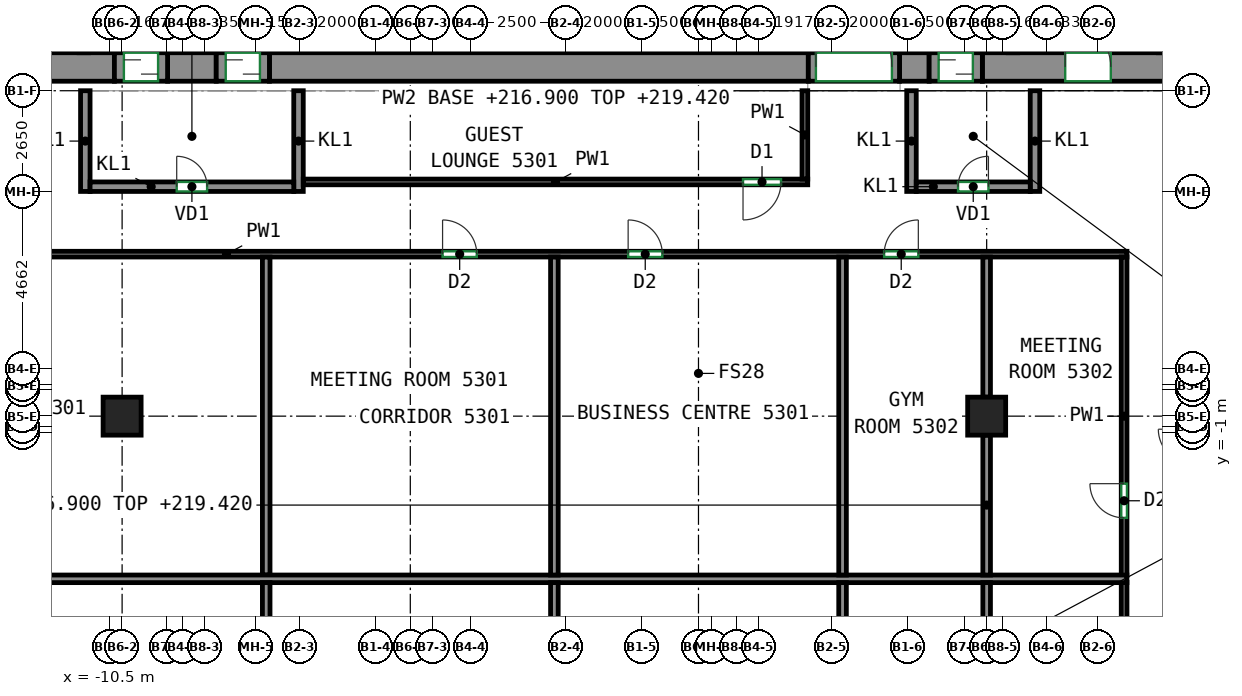
"""IFC4 building model, lengths in metres.
Left out: names, types, materials, properties, quantities, classifications, styles, units other than length and angle.
Written with IfcOpenShell. Run it as: python <this file> out.ifc"""

import sys

from ifc_helpers import new_model, si_unit, direction, frame, frame_2d, origin, origin_2d, place, context, subcontext, project, spatial, rectangle, extrude, source, transform, mapped, element, fill, save


model = new_model("IFC4")
c1 = context("Model", 3, precision=1e-05, world=origin(), true_north=direction((0.0, 1.0)))
c2 = subcontext(c1, "Body", "Model", "MODEL_VIEW")
j1 = project(units=[si_unit("LENGTHUNIT", "METRE"), si_unit("PLANEANGLEUNIT", "RADIAN")], contexts=[c1])
p1 = place(None, origin())
s1 = spatial("IfcSite", under=j1, at=p1, CompositionType="ELEMENT")
p2 = place(p1, origin())
s2 = spatial("IfcBuilding", under=s1, at=p2, CompositionType="ELEMENT")
p3 = place(p2, frame((0.0, 0.0, 216.9)))
s3 = spatial("IfcBuildingStorey", under=s2, at=p3, CompositionType="ELEMENT", Elevation=216.9)
m1 = source(origin(), c2, "Body", "SweptSolid", [
    extrude(rectangle(XDim=1.0, YDim=1.0, at=origin_2d()), origin(), (0.0, 0.0, 1.0), 3.12),
])
for number, where, z_axis, x_axis in (
    (1, (-10.167, -0.562, 0.0), (0.0, 0.0, 1.0), (1.0, 0.0, 0.0)),
    (2, (12.583, -0.562, 0.0), (0.0, 0.0, 1.0), (1.0, 0.0, 0.0)),
):
    element("IfcColumn", number, at=place(p3, frame(where, z_axis=z_axis, x_axis=x_axis)), inside=s3, PredefinedType="COLUMN", context=c2, shape_type="MappedRepresentation", body=[
        mapped(m1, transform((0.0, 0.0, 0.0))),
    ])
m2 = source(origin(), c2, "Body", "SweptSolid", [
    extrude(rectangle(XDim=5.38, YDim=0.75, at=frame_2d((2.69, 0.0))), origin(), (0.0, 0.0, 1.0), 3.12),
])
p4 = place(p3, frame((-15.75, 8.625, 0.0), z_axis=(0.0, 0.0, 1.0), x_axis=(1.0, 0.0, 0.0)))
e3 = element("IfcWall", 3, at=p4, inside=s3, PredefinedType="SHEAR", context=c2, shape_type="MappedRepresentation", body=[
    mapped(m2, transform((0.0, 0.0, 0.0))),
])
p5 = place(p4, frame((2.0, 0.0, 0.0)))
e4 = element("IfcOpeningElement", 4, at=p5, cuts=e3, PredefinedType="OPENING", context=c2, shape_type="SweptSolid", body=[
    extrude(rectangle(XDim=1.2, YDim=2.1, at=frame_2d((0.6, 1.05))), frame((0.0, 0.385, 0.0), z_axis=(0.0, -1.0, 0.0), x_axis=(1.0, 0.0, 0.0)), (0.0, 0.0, 1.0), 0.77),
])
m3 = source(origin(), c2, "Body", "SweptSolid", [
    extrude(rectangle(XDim=1.28, YDim=0.75, at=frame_2d((0.64, 0.0))), origin(), (0.0, 0.0, 1.0), 3.12),
])
p6 = place(p3, frame((-8.97, 8.625, 0.0), z_axis=(0.0, 0.0, 1.0), x_axis=(1.0, 0.0, 0.0)))
e5 = element("IfcWall", 5, at=p6, inside=s3, PredefinedType="SHEAR", context=c2, shape_type="MappedRepresentation", body=[
    mapped(m3, transform((0.0, 0.0, 0.0))),
])
m4 = source(origin(), c2, "Body", "SweptSolid", [
    extrude(rectangle(XDim=14.18, YDim=0.75, at=frame_2d((7.09, 0.0))), origin(), (0.0, 0.0, 1.0), 3.12),
])
p7 = place(p3, frame((-6.29, 8.625, 0.0), z_axis=(0.0, 0.0, 1.0), x_axis=(1.0, 0.0, 0.0)))
e6 = element("IfcWall", 6, at=p7, inside=s3, PredefinedType="SHEAR", context=c2, shape_type="MappedRepresentation", body=[
    mapped(m4, transform((0.0, 0.0, 0.0))),
])
m5 = source(origin(), c2, "Body", "SweptSolid", [
    extrude(rectangle(XDim=0.78, YDim=0.75, at=frame_2d((0.39, 0.0))), origin(), (0.0, 0.0, 1.0), 3.12),
])
p8 = place(p3, frame((10.29, 8.625, 0.0), z_axis=(0.0, 0.0, 1.0), x_axis=(1.0, 0.0, 0.0)))
e7 = element("IfcWall", 7, at=p8, inside=s3, PredefinedType="SHEAR", context=c2, shape_type="MappedRepresentation", body=[
    mapped(m5, transform((0.0, 0.0, 0.0))),
])
m6 = source(origin(), c2, "Body", "SweptSolid", [
    extrude(rectangle(XDim=5.38, YDim=0.75, at=frame_2d((2.69, 0.0))), origin(), (0.0, 0.0, 1.0), 3.12),
])
p9 = place(p3, frame((12.47, 8.625, 0.0), z_axis=(0.0, 0.0, 1.0), x_axis=(1.0, 0.0, 0.0)))
e8 = element("IfcWall", 8, at=p9, inside=s3, PredefinedType="SHEAR", context=c2, shape_type="MappedRepresentation", body=[
    mapped(m6, transform((0.0, 0.0, 0.0))),
])
p10 = place(p9, frame((2.18, 0.0, 0.0)))
e9 = element("IfcOpeningElement", 9, at=p10, cuts=e8, PredefinedType="OPENING", context=c2, shape_type="SweptSolid", body=[
    extrude(rectangle(XDim=1.2, YDim=2.1, at=frame_2d((0.6, 1.05))), frame((0.0, 0.385, 0.0), z_axis=(0.0, -1.0, 0.0), x_axis=(1.0, 0.0, 0.0)), (0.0, 0.0, 1.0), 0.77),
])
m7 = source(origin(), c2, "Body", "SweptSolid", [
    extrude(rectangle(XDim=2.65, YDim=0.25, at=frame_2d((1.325, 0.0))), origin(), (0.0, 0.0, 1.0), 3.12),
])
for number, where, z_axis, x_axis in (
    (10, (-11.135, 5.35, 0.0), (0.0, 0.0, 1.0), (0.0, 1.0, 0.0)),
    (11, (-5.525, 5.35, 0.0), (0.0, 0.0, 1.0), (0.0, 1.0, 0.0)),
):
    element("IfcWall", number, at=place(p3, frame(where, z_axis=z_axis, x_axis=x_axis)), inside=s3, PredefinedType="PARTITIONING", context=c2, shape_type="MappedRepresentation", body=[
        mapped(m7, transform((0.0, 0.0, 0.0))),
    ])
m8 = source(origin(), c2, "Body", "SweptSolid", [
    extrude(rectangle(XDim=5.36, YDim=0.25, at=frame_2d((2.68, 0.0))), origin(), (0.0, 0.0, 1.0), 3.12),
])
p11 = place(p3, frame((-11.01, 5.475, 0.0), z_axis=(0.0, 0.0, 1.0), x_axis=(1.0, 0.0, 0.0)))
e12 = element("IfcWall", 12, at=p11, inside=s3, PredefinedType="PARTITIONING", context=c2, shape_type="MappedRepresentation", body=[
    mapped(m8, transform((0.0, 0.0, 0.0))),
])
p12 = place(p11, frame((2.28, 0.0, 0.0)))
e13 = element("IfcOpeningElement", 13, at=p12, cuts=e12, PredefinedType="OPENING", context=c2, shape_type="SweptSolid", body=[
    extrude(rectangle(XDim=0.8, YDim=2.0, at=frame_2d((0.4, 1.0))), frame((0.0, 0.135, 0.0), z_axis=(0.0, -1.0, 0.0), x_axis=(1.0, 0.0, 0.0)), (0.0, 0.0, 1.0), 0.27),
])
for number, where, z_axis, x_axis in (
    (14, (10.605, 5.35, 0.0), (0.0, 0.0, 1.0), (0.0, 1.0, 0.0)),
    (15, (13.855, 5.35, 0.0), (0.0, 0.0, 1.0), (0.0, 1.0, 0.0)),
):
    element("IfcWall", number, at=place(p3, frame(where, z_axis=z_axis, x_axis=x_axis)), inside=s3, PredefinedType="PARTITIONING", context=c2, shape_type="MappedRepresentation", body=[
        mapped(m7, transform((0.0, 0.0, 0.0))),
    ])
m9 = source(origin(), c2, "Body", "SweptSolid", [
    extrude(rectangle(XDim=3.0, YDim=0.25, at=frame_2d((1.5, 0.0))), origin(), (0.0, 0.0, 1.0), 3.12),
])
p13 = place(p3, frame((10.73, 5.475, 0.0), z_axis=(0.0, 0.0, 1.0), x_axis=(1.0, 0.0, 0.0)))
e16 = element("IfcWall", 16, at=p13, inside=s3, PredefinedType="PARTITIONING", context=c2, shape_type="MappedRepresentation", body=[
    mapped(m9, transform((0.0, 0.0, 0.0))),
])
p14 = place(p13, frame((1.1, 0.0, 0.0)))
e17 = element("IfcOpeningElement", 17, at=p14, cuts=e16, PredefinedType="OPENING", context=c2, shape_type="SweptSolid", body=[
    extrude(rectangle(XDim=0.8, YDim=2.0, at=frame_2d((0.4, 1.0))), frame((0.0, 0.135, 0.0), z_axis=(0.0, -1.0, 0.0), x_axis=(1.0, 0.0, 0.0)), (0.0, 0.0, 1.0), 0.27),
])
m10 = source(origin(), c2, "Body", "SweptSolid", [
    extrude(rectangle(XDim=1.4, YDim=0.75, at=frame_2d((0.7, 0.0))), origin(), (0.0, 0.0, 1.0), 2.7),
])
p15 = place(p3, frame((-10.37, 8.625, 0.0), z_axis=(0.0, 0.0, 1.0), x_axis=(1.0, 0.0, 0.0)))
e18 = element("IfcWall", 18, at=p15, inside=s3, PredefinedType="PARTITIONING", context=c2, shape_type="MappedRepresentation", body=[
    mapped(m10, transform((0.0, 0.0, 0.0))),
])
p16 = place(p15, frame((0.25, 0.0, 0.0)))
e19 = element("IfcOpeningElement", 19, at=p16, cuts=e18, PredefinedType="OPENING", context=c2, shape_type="SweptSolid", body=[
    extrude(rectangle(XDim=0.9, YDim=2.1, at=frame_2d((0.45, 1.05))), frame((0.0, 0.385, 0.0), z_axis=(0.0, -1.0, 0.0), x_axis=(1.0, 0.0, 0.0)), (0.0, 0.0, 1.0), 0.77),
])
m11 = source(origin(), c2, "Body", "SweptSolid", [
    extrude(rectangle(XDim=1.4, YDim=0.75, at=frame_2d((0.7, 0.0))), origin(), (0.0, 0.0, 1.0), 2.7),
])
p17 = place(p3, frame((-7.69, 8.625, 0.0), z_axis=(0.0, 0.0, 1.0), x_axis=(1.0, 0.0, 0.0)))
e20 = element("IfcWall", 20, at=p17, inside=s3, PredefinedType="PARTITIONING", context=c2, shape_type="MappedRepresentation", body=[
    mapped(m11, transform((0.0, 0.0, 0.0))),
])
p18 = place(p17, frame((0.25, 0.0, 0.0)))
e21 = element("IfcOpeningElement", 21, at=p18, cuts=e20, PredefinedType="OPENING", context=c2, shape_type="SweptSolid", body=[
    extrude(rectangle(XDim=0.9, YDim=2.1, at=frame_2d((0.45, 1.05))), frame((0.0, 0.385, 0.0), z_axis=(0.0, -1.0, 0.0), x_axis=(1.0, 0.0, 0.0)), (0.0, 0.0, 1.0), 0.77),
])
m12 = source(origin(), c2, "Body", "SweptSolid", [
    extrude(rectangle(XDim=2.4, YDim=0.75, at=frame_2d((1.2, 0.0))), origin(), (0.0, 0.0, 1.0), 2.7),
])
p19 = place(p3, frame((7.89, 8.625, 0.0), z_axis=(0.0, 0.0, 1.0), x_axis=(1.0, 0.0, 0.0)))
e22 = element("IfcWall", 22, at=p19, inside=s3, PredefinedType="PARTITIONING", context=c2, shape_type="MappedRepresentation", body=[
    mapped(m12, transform((0.0, 0.0, 0.0))),
])
p20 = place(p19, frame((0.2, 0.0, 0.0)))
e23 = element("IfcOpeningElement", 23, at=p20, cuts=e22, PredefinedType="OPENING", context=c2, shape_type="SweptSolid", body=[
    extrude(rectangle(XDim=2.0, YDim=2.1, at=frame_2d((1.0, 1.05))), frame((0.0, 0.385, 0.0), z_axis=(0.0, -1.0, 0.0), x_axis=(1.0, 0.0, 0.0)), (0.0, 0.0, 1.0), 0.77),
])
p21 = place(p3, frame((11.07, 8.625, 0.0), z_axis=(0.0, 0.0, 1.0), x_axis=(1.0, 0.0, 0.0)))
e24 = element("IfcWall", 24, at=p21, inside=s3, PredefinedType="PARTITIONING", context=c2, shape_type="MappedRepresentation", body=[
    mapped(m11, transform((0.0, 0.0, 0.0))),
])
p22 = place(p21, frame((0.25, 0.0, 0.0)))
e25 = element("IfcOpeningElement", 25, at=p22, cuts=e24, PredefinedType="OPENING", context=c2, shape_type="SweptSolid", body=[
    extrude(rectangle(XDim=0.9, YDim=2.1, at=frame_2d((0.45, 1.05))), frame((0.0, 0.385, 0.0), z_axis=(0.0, -1.0, 0.0), x_axis=(1.0, 0.0, 0.0)), (0.0, 0.0, 1.0), 0.77),
])
p23 = place(p3, frame((7.875, 5.6, 0.0), z_axis=(0.0, 0.0, 1.0), x_axis=(-1.0, 0.0, 0.0)))
e26 = element("IfcWall", 26, at=p23, inside=s3, PredefinedType="PARTITIONING", context=c2, shape_type="SweptSolid", body=[
    extrude(rectangle(XDim=13.275, YDim=0.15, at=frame_2d((6.637, 0.0))), origin(), (0.0, 0.0, 1.0), 3.12),
])
p24 = place(p23, frame((0.703, 0.0, 0.0)))
e27 = element("IfcOpeningElement", 27, at=p24, cuts=e26, PredefinedType="OPENING", context=c2, shape_type="SweptSolid", body=[
    extrude(rectangle(XDim=1.0, YDim=2.1, at=frame_2d((0.5, 1.05))), frame((0.0, 0.085, 0.0), z_axis=(0.0, -1.0, 0.0), x_axis=(1.0, 0.0, 0.0)), (0.0, 0.0, 1.0), 0.17),
])
p25 = place(p3, frame((7.8, 8.0, 0.0), z_axis=(0.0, 0.0, 1.0), x_axis=(0.0, -1.0, 0.0)))
e28 = element("IfcWall", 28, at=p25, inside=s3, PredefinedType="PARTITIONING", context=c2, shape_type="SweptSolid", body=[
    extrude(rectangle(XDim=2.325, YDim=0.15, at=frame_2d((1.163, 0.0))), origin(), (0.0, 0.0, 1.0), 3.12),
])
p26 = place(p3, frame((-17.575, 3.7, 0.0), z_axis=(0.0, 0.0, 1.0), x_axis=(1.0, 0.0, 0.0)))
e29 = element("IfcWall", 29, at=p26, inside=s3, PredefinedType="PARTITIONING", context=c2, shape_type="SweptSolid", body=[
    extrude(rectangle(XDim=33.85, YDim=0.15, at=frame_2d((16.925, 0.0))), origin(), (0.0, 0.0, 1.0), 3.12),
])
p27 = place(p26, frame((1.902, 0.0, 0.0)))
e30 = element("IfcOpeningElement", 30, at=p27, cuts=e29, PredefinedType="OPENING", context=c2, shape_type="SweptSolid", body=[
    extrude(rectangle(XDim=0.9, YDim=2.1, at=frame_2d((0.45, 1.05))), frame((0.0, 0.085, 0.0), z_axis=(0.0, -1.0, 0.0), x_axis=(1.0, 0.0, 0.0)), (0.0, 0.0, 1.0), 0.17),
])
p28 = place(p26, frame((15.841, 0.0, 0.0)))
e31 = element("IfcOpeningElement", 31, at=p28, cuts=e29, PredefinedType="OPENING", context=c2, shape_type="SweptSolid", body=[
    extrude(rectangle(XDim=0.9, YDim=2.1, at=frame_2d((0.45, 1.05))), frame((0.0, 0.085, 0.0), z_axis=(0.0, -1.0, 0.0), x_axis=(1.0, 0.0, 0.0)), (0.0, 0.0, 1.0), 0.17),
])
p29 = place(p26, frame((20.724, 0.0, 0.0)))
e32 = element("IfcOpeningElement", 32, at=p29, cuts=e29, PredefinedType="OPENING", context=c2, shape_type="SweptSolid", body=[
    extrude(rectangle(XDim=0.9, YDim=2.1, at=frame_2d((0.45, 1.05))), frame((0.0, 0.085, 0.0), z_axis=(0.0, -1.0, 0.0), x_axis=(1.0, 0.0, 0.0)), (0.0, 0.0, 1.0), 0.17),
])
p30 = place(p26, frame((27.46, 0.0, 0.0)))
e33 = element("IfcOpeningElement", 33, at=p30, cuts=e29, PredefinedType="OPENING", context=c2, shape_type="SweptSolid", body=[
    extrude(rectangle(XDim=0.9, YDim=2.1, at=frame_2d((0.45, 1.05))), frame((0.0, 0.085, 0.0), z_axis=(0.0, -1.0, 0.0), x_axis=(1.0, 0.0, 0.0)), (0.0, 0.0, 1.0), 0.17),
])
p31 = place(p3, frame((16.2, -4.753, 0.0), z_axis=(0.0, 0.0, 1.0), x_axis=(0.0, 1.0, 0.0)))
e34 = element("IfcWall", 34, at=p31, inside=s3, PredefinedType="PARTITIONING", context=c2, shape_type="SweptSolid", body=[
    extrude(rectangle(XDim=8.378, YDim=0.15, at=frame_2d((4.189, 0.0))), origin(), (0.0, 0.0, 1.0), 3.12),
])
p32 = place(p31, frame((1.514, 0.0, 0.0)))
e35 = element("IfcOpeningElement", 35, at=p32, cuts=e34, PredefinedType="OPENING", context=c2, shape_type="SweptSolid", body=[
    extrude(rectangle(XDim=0.9, YDim=2.1, at=frame_2d((0.45, 1.05))), frame((0.0, 0.085, 0.0), z_axis=(0.0, -1.0, 0.0), x_axis=(1.0, 0.0, 0.0)), (0.0, 0.0, 1.0), 0.17),
])
p33 = place(p3, frame((16.2, -15.425, 0.0), z_axis=(0.0, 0.0, 1.0), x_axis=(0.0, 1.0, 0.0)))
e36 = element("IfcWall", 36, at=p33, inside=s3, PredefinedType="PARTITIONING", context=c2, shape_type="SweptSolid", body=[
    extrude(rectangle(XDim=10.492, YDim=0.15, at=frame_2d((5.246, 0.0))), origin(), (0.0, 0.0, 1.0), 3.12),
])
p34 = place(p33, frame((8.584, 0.0, 0.0)))
e37 = element("IfcOpeningElement", 37, at=p34, cuts=e36, PredefinedType="OPENING", context=c2, shape_type="SweptSolid", body=[
    extrude(rectangle(XDim=0.9, YDim=2.1, at=frame_2d((0.45, 1.05))), frame((0.0, 0.085, 0.0), z_axis=(0.0, -1.0, 0.0), x_axis=(1.0, 0.0, 0.0)), (0.0, 0.0, 1.0), 0.17),
])
p35 = place(p3, frame((-6.375, -4.743, 0.0), z_axis=(0.0, 0.0, 1.0), x_axis=(0.0, 1.0, 0.0)))
e38 = element("IfcWall", 38, at=p35, inside=s3, PredefinedType="PARTITIONING", context=c2, shape_type="SweptSolid", body=[
    extrude(rectangle(XDim=8.366, YDim=0.2, at=frame_2d((4.183, 0.0))), origin(), (0.0, 0.0, 1.0), 3.12),
])
p36 = place(p3, frame((-13.873, -4.843, 0.0), z_axis=(0.0, 0.0, 1.0), x_axis=(1.0, 0.0, 0.0)))
e39 = element("IfcWall", 39, at=p36, inside=s3, PredefinedType="PARTITIONING", context=c2, shape_type="SweptSolid", body=[
    extrude(rectangle(XDim=30.146, YDim=0.2, at=frame_2d((15.073, 0.0))), origin(), (0.0, 0.0, 1.0), 3.12),
])
for number, where, z_axis, x_axis in (
    (40, (1.208, -4.743, 0.0), (0.0, 0.0, 1.0), (0.0, 1.0, 0.0)),
    (41, (8.791, -4.743, 0.0), (0.0, 0.0, 1.0), (0.0, 1.0, 0.0)),
):
    element("IfcWall", number, at=place(p3, frame(where, z_axis=z_axis, x_axis=x_axis)), inside=s3, PredefinedType="PARTITIONING", context=c2, shape_type="SweptSolid", body=[
        extrude(rectangle(XDim=8.366, YDim=0.2, at=frame_2d((4.183, 0.0))), origin(), (0.0, 0.0, 1.0), 3.12),
    ])
p37 = place(p3, frame((12.583, -0.062, 0.0), z_axis=(0.0, 0.0, 1.0), x_axis=(0.0, 1.0, 0.0)))
e42 = element("IfcWall", 42, at=p37, inside=s3, PredefinedType="PARTITIONING", context=c2, shape_type="SweptSolid", body=[
    extrude(rectangle(XDim=3.685, YDim=0.2, at=frame_2d((1.843, 0.0))), origin(), (0.0, 0.0, 1.0), 3.12),
])
p38 = place(p3, frame((12.583, -4.743, 0.0), z_axis=(0.0, 0.0, 1.0), x_axis=(0.0, 1.0, 0.0)))
e43 = element("IfcWall", 43, at=p38, inside=s3, PredefinedType="PARTITIONING", context=c2, shape_type="SweptSolid", body=[
    extrude(rectangle(XDim=3.681, YDim=0.2, at=frame_2d((1.84, 0.0))), origin(), (0.0, 0.0, 1.0), 2.52),
])
for number, where, z_axis, x_axis in (
    (44, (-6.375, -15.423, 0.0), (0.0, 0.0, 1.0), (0.0, 1.0, 0.0)),
    (45, (1.208, -15.423, 0.0), (0.0, 0.0, 1.0), (0.0, 1.0, 0.0)),
    (46, (8.791, -15.423, 0.0), (0.0, 0.0, 1.0), (0.0, 1.0, 0.0)),
):
    element("IfcWall", number, at=place(p3, frame(where, z_axis=z_axis, x_axis=x_axis)), inside=s3, PredefinedType="PARTITIONING", context=c2, shape_type="SweptSolid", body=[
        extrude(rectangle(XDim=10.48, YDim=0.2, at=frame_2d((5.24, 0.0))), origin(), (0.0, 0.0, 1.0), 3.12),
    ])
p39 = place(p3, frame((12.583, -8.625, 0.0), z_axis=(0.0, 0.0, 1.0), x_axis=(0.0, 1.0, 0.0)))
e47 = element("IfcWall", 47, at=p39, inside=s3, PredefinedType="PARTITIONING", context=c2, shape_type="SweptSolid", body=[
    extrude(rectangle(XDim=3.682, YDim=0.2, at=frame_2d((1.841, 0.0))), origin(), (0.0, 0.0, 1.0), 2.52),
])
p40 = place(p20, origin())
e48 = element("IfcDoor", 48, at=p40, inside=s3, OperationType="DOUBLE_DOOR_SINGLE_SWING", PredefinedType="DOOR", context=c2, shape_type="SweptSolid", body=[
    extrude(rectangle(XDim=2.0, YDim=2.1, at=frame_2d((1.0, 1.05))), frame((0.0, 0.28, 0.0), z_axis=(0.0, -1.0, 0.0), x_axis=(1.0, 0.0, 0.0)), (0.0, 0.0, 1.0), 0.05),
])
fill(e23, e48)
p41 = place(p12, origin())
e49 = element("IfcDoor", 49, at=p41, inside=s3, OperationType="SINGLE_SWING_LEFT", PredefinedType="DOOR", context=c2, shape_type="SweptSolid", body=[
    extrude(rectangle(XDim=0.8, YDim=2.0, at=frame_2d((0.4, 1.0))), frame((0.0, 0.025, 0.0), z_axis=(0.0, -1.0, 0.0), x_axis=(1.0, 0.0, 0.0)), (0.0, 0.0, 1.0), 0.05),
])
fill(e13, e49)
p42 = place(p14, origin())
e50 = element("IfcDoor", 50, at=p42, inside=s3, OperationType="SINGLE_SWING_RIGHT", PredefinedType="DOOR", context=c2, shape_type="SweptSolid", body=[
    extrude(rectangle(XDim=0.8, YDim=2.0, at=frame_2d((0.4, 1.0))), frame((0.0, 0.025, 0.0), z_axis=(0.0, -1.0, 0.0), x_axis=(1.0, 0.0, 0.0)), (0.0, 0.0, 1.0), 0.05),
])
fill(e17, e50)
p43 = place(p16, origin())
e51 = element("IfcDoor", 51, at=p43, inside=s3, OperationType="SLIDING_TO_LEFT", PredefinedType="DOOR", context=c2, shape_type="SweptSolid", body=[
    extrude(rectangle(XDim=0.9, YDim=2.1, at=frame_2d((0.45, 1.05))), frame((0.0, 0.28, 0.0), z_axis=(0.0, -1.0, 0.0), x_axis=(1.0, 0.0, 0.0)), (0.0, 0.0, 1.0), 0.05),
])
fill(e19, e51)
p44 = place(p18, origin())
e52 = element("IfcDoor", 52, at=p44, inside=s3, OperationType="SLIDING_TO_RIGHT", PredefinedType="DOOR", context=c2, shape_type="SweptSolid", body=[
    extrude(rectangle(XDim=0.9, YDim=2.1, at=frame_2d((0.45, 1.05))), frame((0.0, 0.28, 0.0), z_axis=(0.0, -1.0, 0.0), x_axis=(1.0, 0.0, 0.0)), (0.0, 0.0, 1.0), 0.05),
])
fill(e21, e52)
p45 = place(p22, origin())
e53 = element("IfcDoor", 53, at=p45, inside=s3, OperationType="SLIDING_TO_LEFT", PredefinedType="DOOR", context=c2, shape_type="SweptSolid", body=[
    extrude(rectangle(XDim=0.9, YDim=2.1, at=frame_2d((0.45, 1.05))), frame((0.0, 0.28, 0.0), z_axis=(0.0, -1.0, 0.0), x_axis=(1.0, 0.0, 0.0)), (0.0, 0.0, 1.0), 0.05),
])
fill(e25, e53)
p46 = place(p10, origin())
e54 = element("IfcDoor", 54, at=p46, inside=s3, OperationType="DOUBLE_DOOR_SINGLE_SWING", PredefinedType="DOOR", context=c2, shape_type="SweptSolid", body=[
    extrude(rectangle(XDim=1.2, YDim=2.1, at=frame_2d((0.6, 1.05))), frame((0.0, 0.28, 0.0), z_axis=(0.0, -1.0, 0.0), x_axis=(1.0, 0.0, 0.0)), (0.0, 0.0, 1.0), 0.05),
])
fill(e9, e54)
p47 = place(p32, origin())
e55 = element("IfcDoor", 55, at=p47, inside=s3, OperationType="SINGLE_SWING_RIGHT", PredefinedType="DOOR", context=c2, shape_type="SweptSolid", body=[
    extrude(rectangle(XDim=0.9, YDim=2.1, at=frame_2d((0.45, 1.05))), frame((0.0, 0.025, 0.0), z_axis=(0.0, -1.0, 0.0), x_axis=(1.0, 0.0, 0.0)), (0.0, 0.0, 1.0), 0.05),
])
fill(e35, e55)
p48 = place(p28, origin())
e56 = element("IfcDoor", 56, at=p48, inside=s3, OperationType="SINGLE_SWING_LEFT", PredefinedType="DOOR", context=c2, shape_type="SweptSolid", body=[
    extrude(rectangle(XDim=0.9, YDim=2.1, at=frame_2d((0.45, 1.05))), frame((0.0, 0.025, 0.0), z_axis=(0.0, -1.0, 0.0), x_axis=(1.0, 0.0, 0.0)), (0.0, 0.0, 1.0), 0.05),
])
fill(e31, e56)
p49 = place(p29, origin())
e57 = element("IfcDoor", 57, at=p49, inside=s3, OperationType="SINGLE_SWING_LEFT", PredefinedType="DOOR", context=c2, shape_type="SweptSolid", body=[
    extrude(rectangle(XDim=0.9, YDim=2.1, at=frame_2d((0.45, 1.05))), frame((0.0, 0.025, 0.0), z_axis=(0.0, -1.0, 0.0), x_axis=(1.0, 0.0, 0.0)), (0.0, 0.0, 1.0), 0.05),
])
fill(e32, e57)
p50 = place(p30, origin())
e58 = element("IfcDoor", 58, at=p50, inside=s3, OperationType="SINGLE_SWING_RIGHT", PredefinedType="DOOR", context=c2, shape_type="SweptSolid", body=[
    extrude(rectangle(XDim=0.9, YDim=2.1, at=frame_2d((0.45, 1.05))), frame((0.0, 0.025, 0.0), z_axis=(0.0, -1.0, 0.0), x_axis=(1.0, 0.0, 0.0)), (0.0, 0.0, 1.0), 0.05),
])
fill(e33, e58)
p51 = place(p24, origin())
e59 = element("IfcDoor", 59, at=p51, inside=s3, OperationType="SINGLE_SWING_RIGHT", PredefinedType="DOOR", context=c2, shape_type="SweptSolid", body=[
    extrude(rectangle(XDim=1.0, YDim=2.1, at=frame_2d((0.5, 1.05))), frame((0.0, 0.025, 0.0), z_axis=(0.0, -1.0, 0.0), x_axis=(1.0, 0.0, 0.0)), (0.0, 0.0, 1.0), 0.05),
])
fill(e27, e59)
save(model, sys.argv[1])
